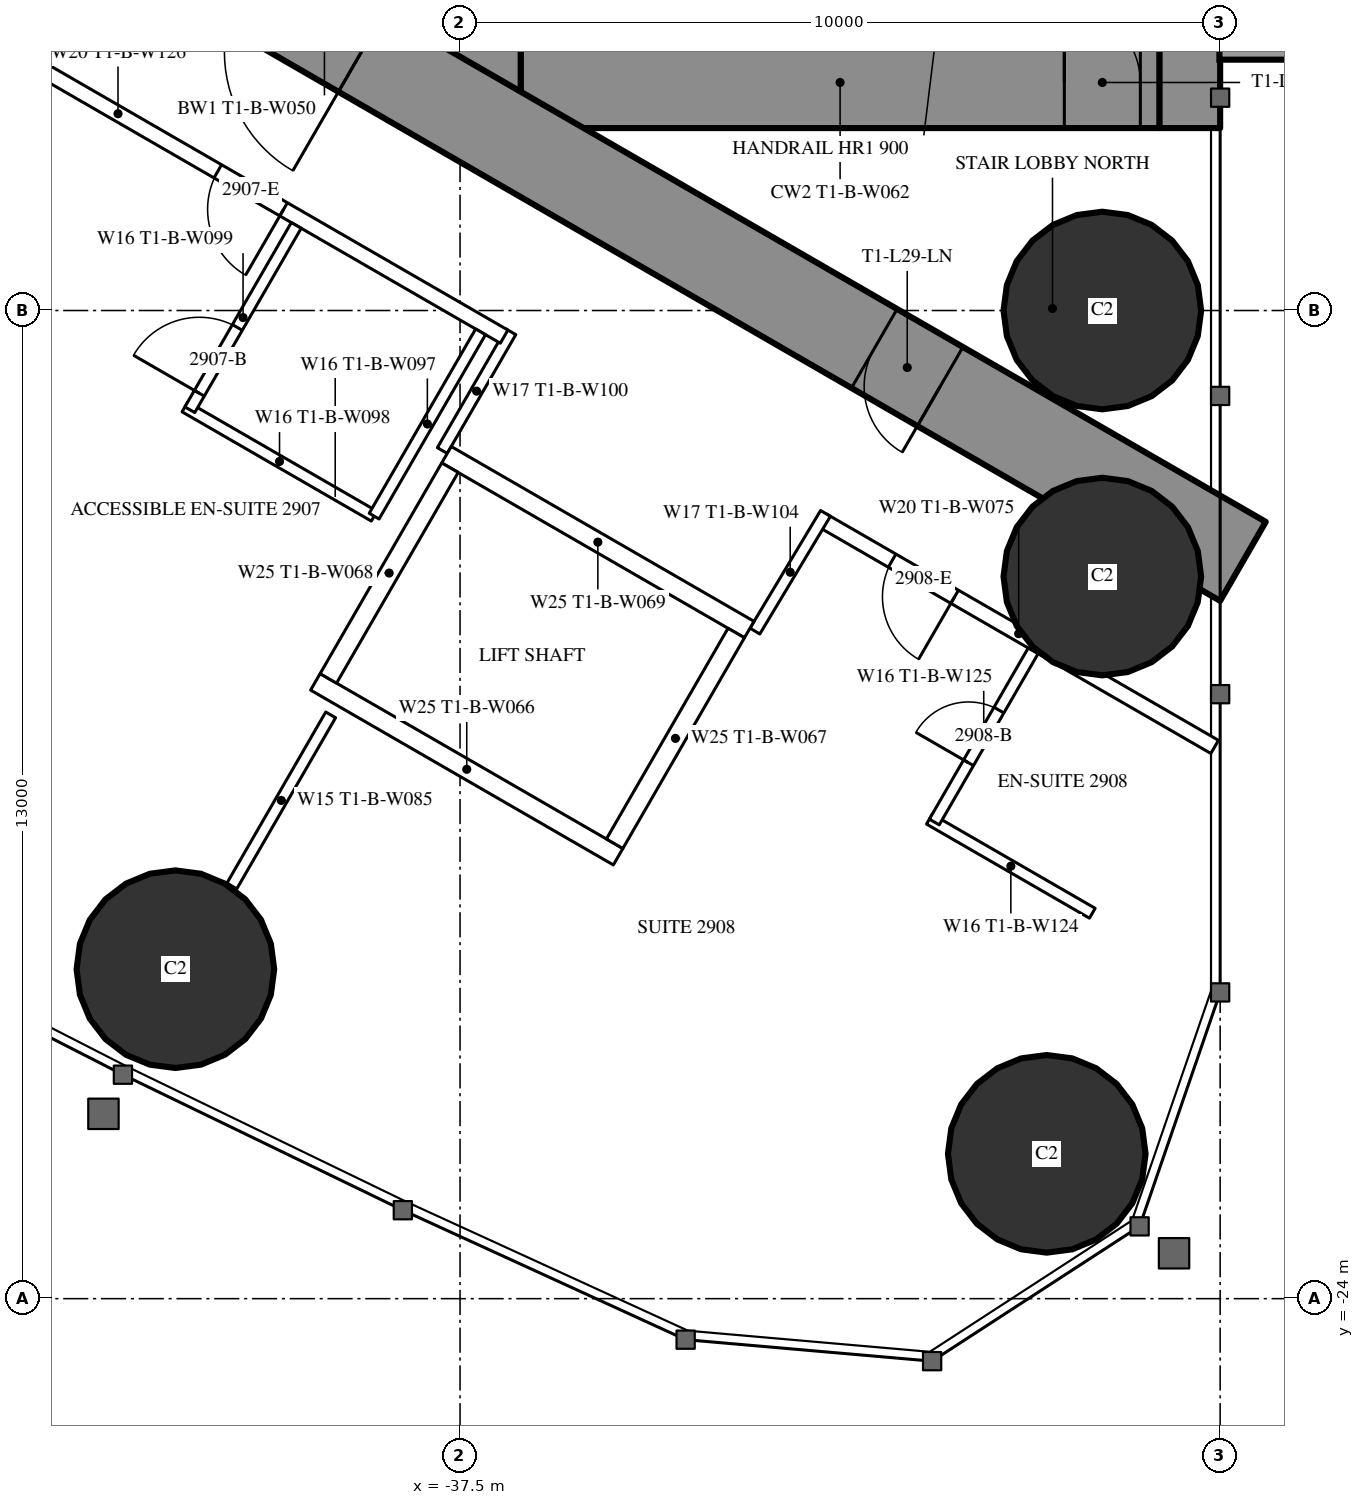
"""IFC4 building model, lengths in metres.
Left out: names, types, materials, properties, quantities, classifications, styles, units other than length and angle.
Written with IfcOpenShell. Run it as: python <this file> out.ifc"""

import sys

from ifc_helpers import new_model, si_unit, direction, frame, frame_2d, origin, origin_2d, place, context, subcontext, project, spatial, rectangle, hollow_circle, extrude, element, fill, save


model = new_model("IFC4")
c1 = context("Model", 3, precision=1e-05, world=origin(), true_north=direction((0.0, 1.0)))
c2 = subcontext(c1, "Body", "Model", "MODEL_VIEW")
j1 = project(units=[si_unit("LENGTHUNIT", "METRE"), si_unit("PLANEANGLEUNIT", "RADIAN")], contexts=[c1])
p1 = place(None, origin())
s1 = spatial("IfcSite", under=j1, at=p1, CompositionType="ELEMENT")
p2 = place(p1, origin())
s2 = spatial("IfcBuilding", under=s1, at=p2, CompositionType="ELEMENT")
p3 = place(p2, frame((0.0, 0.0, 111.6)))
s3 = spatial("IfcBuildingStorey", under=s2, at=p3, CompositionType="ELEMENT", Elevation=111.6)
for number, where, z_axis, x_axis in (
    (1, (-29.781, -22.095, 0.0), (0.0, 0.0, 1.0), (1.0, 0.0, 0.0)),
    (2, (-29.05, -11.0, 0.0), (0.0, 0.0, 1.0), (1.0, 0.0, 0.0)),
    (3, (-29.05, -14.5, 0.0), (0.0, 0.0, 1.0), (1.0, 0.0, 0.0)),
    (4, (-41.245, -19.666, 0.0), (0.0, 0.0, 1.0), (1.0, 0.0, 0.0)),
):
    element("IfcColumn", number, at=place(p3, frame(where, z_axis=z_axis, x_axis=x_axis)), inside=s3, PredefinedType="COLUMN", context=c2, shape_type="SweptSolid", body=[
        extrude(hollow_circle(Radius=1.3, WallThickness=0.1, at=origin_2d()), origin(), (0.0, 0.0, 1.0), 3.5),
    ])
p4 = place(p3, frame((-27.9, 8.6, 0.0), z_axis=(0.0, 0.0, 1.0), x_axis=(0.0, -1.0, 0.0)))
e5 = element("IfcWall", 5, at=p4, inside=s3, PredefinedType="SHEAR", context=c2, shape_type="SweptSolid", body=[
    extrude(rectangle(XDim=17.2, YDim=0.8, at=frame_2d((8.6, 0.0))), origin(), (0.0, 0.0, 1.0), 3.5),
])
p5 = place(p4, frame((2.45, 0.0, 0.6)))
e6 = element("IfcOpeningElement", 6, at=p5, cuts=e5, PredefinedType="OPENING", context=c2, shape_type="SweptSolid", body=[
    extrude(rectangle(XDim=0.6, YDim=2.1, at=frame_2d((0.3, 1.05))), frame((0.0, 0.41, 0.0), z_axis=(0.0, -1.0, 0.0), x_axis=(1.0, 0.0, 0.0)), (0.0, 0.0, 1.0), 0.82),
])
p6 = place(p4, frame((14.15, 0.0, 0.6)))
e7 = element("IfcOpeningElement", 7, at=p6, cuts=e5, PredefinedType="OPENING", context=c2, shape_type="SweptSolid", body=[
    extrude(rectangle(XDim=0.6, YDim=2.1, at=frame_2d((0.3, 1.05))), frame((0.0, 0.41, 0.0), z_axis=(0.0, -1.0, 0.0), x_axis=(1.0, 0.0, 0.0)), (0.0, 0.0, 1.0), 0.82),
])
p7 = place(p3, frame((-37.3, 8.6, 0.0), z_axis=(0.0, 0.0, 1.0), x_axis=(0.0, -1.0, 0.0)))
e8 = element("IfcWall", 8, at=p7, inside=s3, PredefinedType="SHEAR", context=c2, shape_type="SweptSolid", body=[
    extrude(rectangle(XDim=17.2, YDim=1.2, at=frame_2d((8.6, 0.0))), origin(), (0.0, 0.0, 1.0), 3.5),
])
p8 = place(p7, frame((7.7, 0.0, 0.0)))
e9 = element("IfcOpeningElement", 9, at=p8, cuts=e8, PredefinedType="OPENING", context=c2, shape_type="SweptSolid", body=[
    extrude(rectangle(XDim=1.8, YDim=2.2, at=frame_2d((0.9, 1.1))), frame((0.0, 0.61, 0.0), z_axis=(0.0, -1.0, 0.0), x_axis=(1.0, 0.0, 0.0)), (0.0, 0.0, 1.0), 1.22),
])
p9 = place(p3, frame((-28.3, -8.0, 0.0), z_axis=(0.0, 0.0, 1.0), x_axis=(-1.0, 0.0, 0.0)))
e10 = element("IfcWall", 10, at=p9, inside=s3, PredefinedType="SHEAR", context=c2, shape_type="SweptSolid", body=[
    extrude(rectangle(XDim=8.4, YDim=1.2, at=frame_2d((4.2, 0.0))), origin(), (0.0, 0.0, 1.0), 3.5),
])
p10 = place(p9, frame((0.25, 0.0, 0.0)))
e11 = element("IfcOpeningElement", 11, at=p10, cuts=e10, PredefinedType="OPENING", context=c2, shape_type="SweptSolid", body=[
    extrude(rectangle(XDim=1.0, YDim=2.2, at=frame_2d((0.5, 1.1))), frame((0.0, 0.61, 0.0), z_axis=(0.0, -1.0, 0.0), x_axis=(1.0, 0.0, 0.0)), (0.0, 0.0, 1.0), 1.22),
])
p11 = place(p3, frame((-27.2, -14.3, 0.0), z_axis=(0.0, 0.0, 1.0), x_axis=(-0.866024021859, 0.500002393557, 0.0)))
e12 = element("IfcWall", 12, at=p11, inside=s3, PredefinedType="SHEAR", context=c2, shape_type="SweptSolid", body=[
    extrude(rectangle(XDim=27.907, YDim=1.2, at=frame_2d((13.954, 0.0))), origin(), (0.0, 0.0, 1.0), 3.5),
])
p12 = place(p11, frame((4.6, 0.0, 0.0)))
e13 = element("IfcOpeningElement", 13, at=p12, cuts=e12, PredefinedType="OPENING", context=c2, shape_type="SweptSolid", body=[
    extrude(rectangle(XDim=1.0, YDim=2.2, at=frame_2d((0.5, 1.1))), frame((0.0, 0.61, 0.0), z_axis=(0.0, -1.0, 0.0), x_axis=(1.0, 0.0, 0.0)), (0.0, 0.0, 1.0), 1.22),
])
p13 = place(p11, frame((13.395, 0.0, 0.0)))
e14 = element("IfcOpeningElement", 14, at=p13, cuts=e12, PredefinedType="OPENING", context=c2, shape_type="SweptSolid", body=[
    extrude(rectangle(XDim=1.8, YDim=2.2, at=frame_2d((0.9, 1.1))), frame((0.0, 0.61, 0.0), z_axis=(0.0, -1.0, 0.0), x_axis=(1.0, 0.0, 0.0)), (0.0, 0.0, 1.0), 1.22),
])
p14 = place(p3, frame((-39.202, -16.32, 0.0), z_axis=(0.0, 0.0, 1.0), x_axis=(-0.49997716683, -0.86603858612, 0.0)))
e15 = element("IfcWall", 15, at=p14, inside=s3, PredefinedType="PARTITIONING", context=c2, shape_type="SweptSolid", body=[
    extrude(rectangle(XDim=2.6, YDim=0.15, at=frame_2d((1.3, 0.0))), origin(), (0.0, 0.0, 1.0), 3.25),
])
p15 = place(p3, frame((-27.572, -16.741, 0.0), z_axis=(0.0, 0.0, 1.0), x_axis=(-0.866024464444, 0.500001626982, 0.0)))
e16 = element("IfcWall", 16, at=p15, inside=s3, PredefinedType="PARTITIONING", context=c2, shape_type="SweptSolid", body=[
    extrude(rectangle(XDim=5.955, YDim=0.2, at=frame_2d((2.978, 0.0))), origin(), (0.0, 0.0, 1.0), 3.25),
])
p16 = place(p15, frame((3.95, 0.0, 0.0)))
e17 = element("IfcOpeningElement", 17, at=p16, cuts=e16, PredefinedType="OPENING", context=c2, shape_type="SweptSolid", body=[
    extrude(rectangle(XDim=0.95, YDim=2.2, at=frame_2d((0.475, 1.1))), frame((0.0, 0.11, 0.0), z_axis=(0.0, -1.0, 0.0), x_axis=(1.0, 0.0, 0.0)), (0.0, 0.0, 1.0), 0.22),
])
p17 = place(p3, frame((-36.831, -11.28, 0.0), z_axis=(0.0, 0.0, 1.0), x_axis=(-0.499937177781, -0.866061671171, 0.0)))
e18 = element("IfcWall", 18, at=p17, inside=s3, PredefinedType="PARTITIONING", context=c2, shape_type="SweptSolid", body=[
    extrude(rectangle(XDim=1.804, YDim=0.15, at=frame_2d((0.902, 0.0))), origin(), (0.0, 0.0, 1.0), 3.25),
])
p18 = place(p3, frame((-33.621, -15.218, 0.0), z_axis=(0.0, 0.0, 1.0), x_axis=(0.514336634837, 0.857588377991, 0.0)))
e19 = element("IfcWall", 19, at=p18, inside=s3, PredefinedType="PARTITIONING", context=c2, shape_type="SweptSolid", body=[
    extrude(rectangle(XDim=1.805, YDim=0.15, at=frame_2d((0.903, 0.0))), origin(), (0.0, 0.0, 1.0), 3.25),
])
p19 = place(p3, frame((-36.92, -11.344, 0.0), z_axis=(0.0, 0.0, 1.0), x_axis=(-0.866027897759, 0.499995680284, 0.0)))
e20 = element("IfcWall", 20, at=p19, inside=s3, PredefinedType="PARTITIONING", context=c2, shape_type="SweptSolid", body=[
    extrude(rectangle(XDim=11.731, YDim=0.2, at=frame_2d((5.865, 0.0))), origin(), (0.0, 0.0, 1.0), 3.25),
])
p20 = place(p19, frame((3.35, 0.0, 0.0)))
e21 = element("IfcOpeningElement", 21, at=p20, cuts=e20, PredefinedType="OPENING", context=c2, shape_type="SweptSolid", body=[
    extrude(rectangle(XDim=1.0, YDim=2.2, at=frame_2d((0.5, 1.1))), frame((0.0, 0.11, 0.0), z_axis=(0.0, -1.0, 0.0), x_axis=(1.0, 0.0, 0.0)), (0.0, 0.0, 1.0), 0.22),
])
p21 = place(p3, frame((-38.63, -13.705, 0.0), z_axis=(0.0, 0.0, 1.0), x_axis=(-0.866018712932, 0.500011588718, 0.0)))
e22 = element("IfcWall", 22, at=p21, inside=s3, PredefinedType="PARTITIONING", context=c2, shape_type="SweptSolid", body=[
    extrude(rectangle(XDim=2.875, YDim=0.15, at=frame_2d((1.438, 0.0))), origin(), (0.0, 0.0, 1.0), 3.25),
])
p22 = place(p3, frame((-39.655, -9.88, 0.0), z_axis=(0.0, 0.0, 1.0), x_axis=(-0.500049511043, -0.865996816683, 0.0)))
e23 = element("IfcWall", 23, at=p22, inside=s3, PredefinedType="PARTITIONING", context=c2, shape_type="SweptSolid", body=[
    extrude(rectangle(XDim=2.8, YDim=0.15, at=frame_2d((1.4, 0.0))), origin(), (0.0, 0.0, 1.0), 3.25),
])
p23 = place(p22, frame((1.55, 0.0, 0.0)))
e24 = element("IfcOpeningElement", 24, at=p23, cuts=e23, PredefinedType="OPENING", context=c2, shape_type="SweptSolid", body=[
    extrude(rectangle(XDim=1.0, YDim=2.2, at=frame_2d((0.5, 1.1))), frame((0.0, 0.085, 0.0), z_axis=(0.0, -1.0, 0.0), x_axis=(1.0, 0.0, 0.0)), (0.0, 0.0, 1.0), 0.17),
])
p24 = place(p3, frame((-37.23, -11.281, 0.0), z_axis=(0.0, 0.0, 1.0), x_axis=(-0.500049511043, -0.865996816683, 0.0)))
e25 = element("IfcWall", 25, at=p24, inside=s3, PredefinedType="PARTITIONING", context=c2, shape_type="SweptSolid", body=[
    extrude(rectangle(XDim=2.8, YDim=0.15, at=frame_2d((1.4, 0.0))), origin(), (0.0, 0.0, 1.0), 3.25),
])
p25 = place(p3, frame((-29.182, -18.929, 0.0), z_axis=(0.0, 0.0, 1.0), x_axis=(-0.866006523861, 0.500032699561, 0.0)))
e26 = element("IfcWall", 26, at=p25, inside=s3, PredefinedType="PARTITIONING", context=c2, shape_type="SweptSolid", body=[
    extrude(rectangle(XDim=2.475, YDim=0.15, at=frame_2d((1.237, 0.0))), origin(), (0.0, 0.0, 1.0), 3.25),
])
p26 = place(p3, frame((-29.96, -15.478, 0.0), z_axis=(0.0, 0.0, 1.0), x_axis=(-0.500006934395, -0.866021400173, 0.0)))
e27 = element("IfcWall", 27, at=p26, inside=s3, PredefinedType="PARTITIONING", context=c2, shape_type="SweptSolid", body=[
    extrude(rectangle(XDim=2.6, YDim=0.15, at=frame_2d((1.3, 0.0))), origin(), (0.0, 0.0, 1.0), 3.25),
])
p27 = place(p26, frame((0.9, 0.0, 0.0)))
e28 = element("IfcOpeningElement", 28, at=p27, cuts=e27, PredefinedType="OPENING", context=c2, shape_type="SweptSolid", body=[
    extrude(rectangle(XDim=0.8, YDim=2.2, at=frame_2d((0.4, 1.1))), frame((0.0, 0.085, 0.0), z_axis=(0.0, -1.0, 0.0), x_axis=(1.0, 0.0, 0.0)), (0.0, 0.0, 1.0), 0.17),
])
p28 = place(p3, frame((-33.696, -15.197, 0.0), z_axis=(0.0, 0.0, 1.0), x_axis=(-0.865976953817, 0.500083908417, 0.0)))
e29 = element("IfcWall", 29, at=p28, inside=s3, PredefinedType="PARTITIONING", context=c2, shape_type="SweptSolid", body=[
    extrude(rectangle(XDim=4.599, YDim=0.25, at=frame_2d((2.3, 0.0))), origin(), (0.0, 0.0, 1.0), 3.25),
])
p29 = place(p3, frame((-35.42, -18.186, 0.0), z_axis=(0.0, 0.0, 1.0), x_axis=(-0.865990227814, 0.50006092162, 0.0)))
e30 = element("IfcWall", 30, at=p29, inside=s3, PredefinedType="PARTITIONING", context=c2, shape_type="SweptSolid", body=[
    extrude(rectangle(XDim=4.6, YDim=0.25, at=frame_2d((2.3, 0.0))), origin(), (0.0, 0.0, 1.0), 3.25),
])
p30 = place(p3, frame((-33.866, -15.243, 0.0), z_axis=(0.0, 0.0, 1.0), x_axis=(-0.499929347863, -0.866066190972, 0.0)))
e31 = element("IfcWall", 31, at=p30, inside=s3, PredefinedType="PARTITIONING", context=c2, shape_type="SweptSolid", body=[
    extrude(rectangle(XDim=3.201, YDim=0.25, at=frame_2d((1.6, 0.0))), origin(), (0.0, 0.0, 1.0), 3.25),
])
p31 = place(p3, frame((-37.633, -13.068, 0.0), z_axis=(0.0, 0.0, 1.0), x_axis=(-0.499872130319, -0.866099216793, 0.0)))
e32 = element("IfcWall", 32, at=p31, inside=s3, PredefinedType="PARTITIONING", context=c2, shape_type="SweptSolid", body=[
    extrude(rectangle(XDim=3.2, YDim=0.25, at=frame_2d((1.6, 0.0))), origin(), (0.0, 0.0, 1.0), 3.25),
])
p32 = place(p23, origin())
e33 = element("IfcDoor", 33, at=p32, inside=s3, OperationType="SINGLE_SWING_RIGHT", PredefinedType="DOOR", context=c2, shape_type="SweptSolid", body=[
    extrude(rectangle(XDim=1.0, YDim=2.2, at=frame_2d((0.5, 1.1))), frame((0.0, 0.025, 0.0), z_axis=(0.0, -1.0, 0.0), x_axis=(1.0, 0.0, 0.0)), (0.0, 0.0, 1.0), 0.05),
])
fill(e24, e33)
p33 = place(p20, origin())
e34 = element("IfcDoor", 34, at=p33, inside=s3, OperationType="SINGLE_SWING_LEFT", PredefinedType="DOOR", context=c2, shape_type="SweptSolid", body=[
    extrude(rectangle(XDim=1.0, YDim=2.2, at=frame_2d((0.5, 1.1))), frame((0.0, 0.025, 0.0), z_axis=(0.0, -1.0, 0.0), x_axis=(1.0, 0.0, 0.0)), (0.0, 0.0, 1.0), 0.05),
])
fill(e21, e34)
p34 = place(p27, origin())
e35 = element("IfcDoor", 35, at=p34, inside=s3, OperationType="SINGLE_SWING_RIGHT", PredefinedType="DOOR", context=c2, shape_type="SweptSolid", body=[
    extrude(rectangle(XDim=0.8, YDim=2.2, at=frame_2d((0.4, 1.1))), frame((0.0, 0.025, 0.0), z_axis=(0.0, -1.0, 0.0), x_axis=(1.0, 0.0, 0.0)), (0.0, 0.0, 1.0), 0.05),
])
fill(e28, e35)
p35 = place(p16, origin())
e36 = element("IfcDoor", 36, at=p35, inside=s3, OperationType="SINGLE_SWING_LEFT", PredefinedType="DOOR", context=c2, shape_type="SweptSolid", body=[
    extrude(rectangle(XDim=0.95, YDim=2.2, at=frame_2d((0.475, 1.1))), frame((0.0, 0.025, 0.0), z_axis=(0.0, -1.0, 0.0), x_axis=(1.0, 0.0, 0.0)), (0.0, 0.0, 1.0), 0.05),
])
fill(e17, e36)
p36 = place(p12, origin())
e37 = element("IfcDoor", 37, at=p36, inside=s3, OperationType="SINGLE_SWING_LEFT", PredefinedType="DOOR", context=c2, shape_type="SweptSolid", body=[
    extrude(rectangle(XDim=1.0, YDim=2.2, at=frame_2d((0.5, 1.1))), frame((0.0, 0.025, 0.0), z_axis=(0.0, -1.0, 0.0), x_axis=(1.0, 0.0, 0.0)), (0.0, 0.0, 1.0), 0.05),
])
fill(e13, e37)
p37 = place(p13, origin())
e38 = element("IfcDoor", 38, at=p37, inside=s3, OperationType="DOUBLE_DOOR_SINGLE_SWING", PredefinedType="DOOR", context=c2, shape_type="SweptSolid", body=[
    extrude(rectangle(XDim=1.8, YDim=2.2, at=frame_2d((0.9, 1.1))), frame((0.0, 0.025, 0.0), z_axis=(0.0, -1.0, 0.0), x_axis=(1.0, 0.0, 0.0)), (0.0, 0.0, 1.0), 0.05),
])
fill(e14, e38)
p38 = place(p10, origin())
e39 = element("IfcDoor", 39, at=p38, inside=s3, OperationType="SINGLE_SWING_RIGHT", PredefinedType="DOOR", context=c2, shape_type="SweptSolid", body=[
    extrude(rectangle(XDim=1.0, YDim=2.2, at=frame_2d((0.5, 1.1))), frame((0.0, 0.025, 0.0), z_axis=(0.0, -1.0, 0.0), x_axis=(1.0, 0.0, 0.0)), (0.0, 0.0, 1.0), 0.05),
])
fill(e11, e39)
save(model, sys.argv[1])
